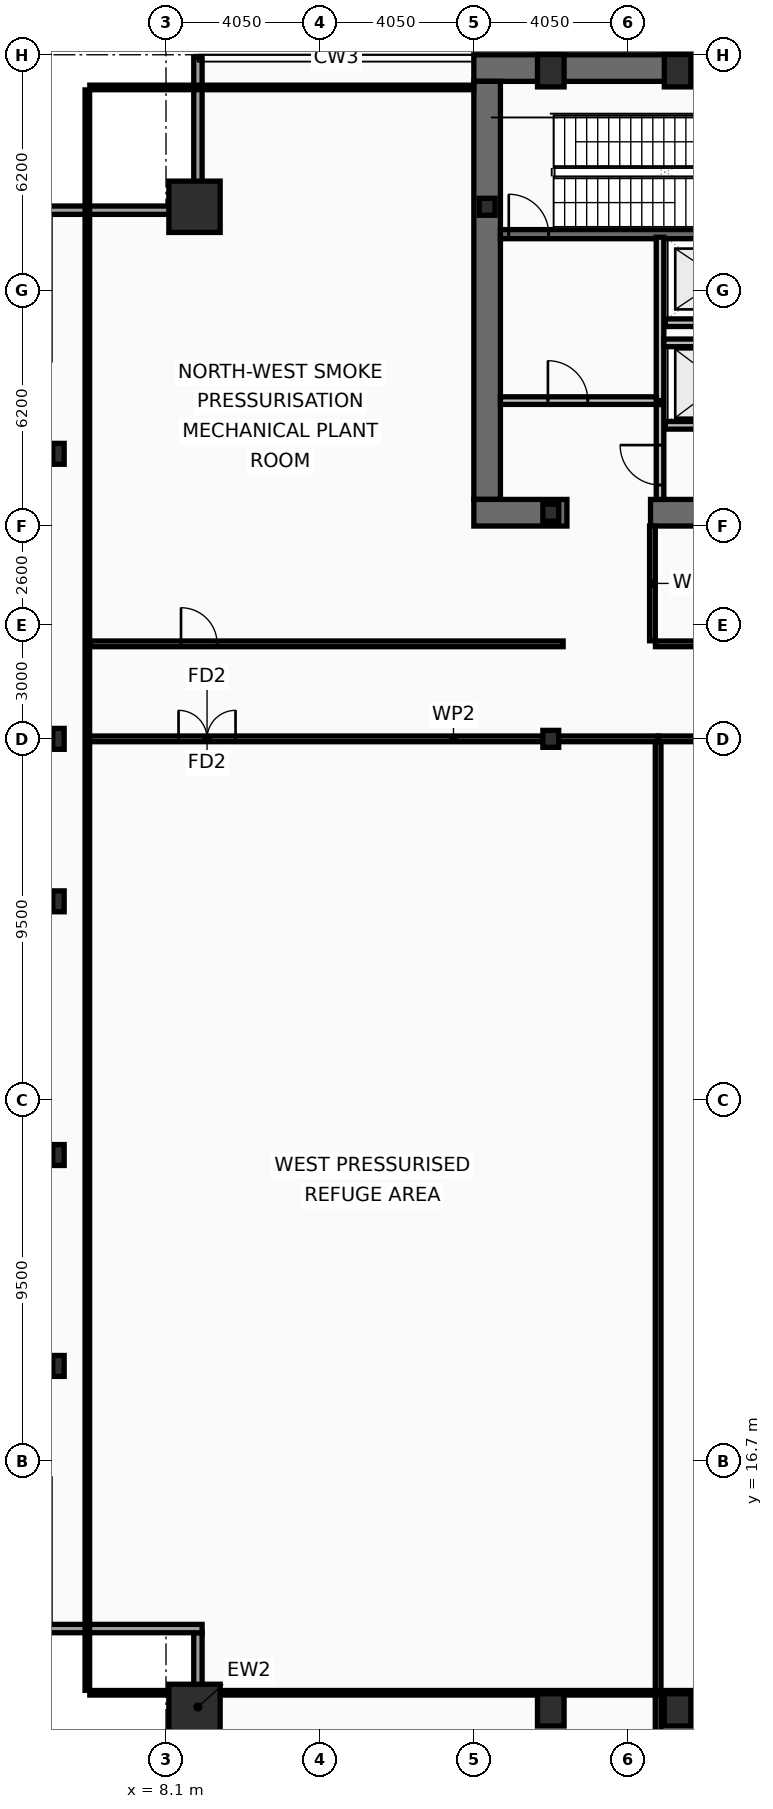
"""IFC4 building model, lengths in metres.
Left out: names, types, materials, properties, quantities, classifications, styles, units other than length and angle.
Written with IfcOpenShell. Run it as: python <this file> out.ifc"""

import sys

from ifc_helpers import new_model, si_unit, direction, frame, frame_2d, origin, origin_2d, place, context, subcontext, project, spatial, rectangle, hollow_rectangle, i_section, extrude, element, fill, save


model = new_model("IFC4")
c1 = context("Model", 3, precision=1e-05, world=origin(), true_north=direction((0.0, 1.0)))
c2 = subcontext(c1, "Body", "Model", "MODEL_VIEW")
j1 = project(units=[si_unit("LENGTHUNIT", "METRE"), si_unit("PLANEANGLEUNIT", "RADIAN")], contexts=[c1])
p1 = place(None, origin())
s1 = spatial("IfcSite", under=j1, at=p1, CompositionType="ELEMENT")
p2 = place(p1, origin())
s2 = spatial("IfcBuilding", under=s1, at=p2, CompositionType="ELEMENT")
p3 = place(p2, frame((0.0, 0.0, 172.2)))
s3 = spatial("IfcBuildingStorey", under=s2, at=p3, CompositionType="ELEMENT", Elevation=172.2)
p4 = place(p3, frame((16.2, 53.35, 0.0), z_axis=(0.0, 0.0, 1.0), x_axis=(1.0, 0.0, 0.0)))
e1 = element("IfcWall", 1, at=p4, inside=s3, PredefinedType="SHEAR", context=c2, shape_type="SweptSolid", body=[
    extrude(rectangle(XDim=40.5, YDim=0.7, at=frame_2d((20.25, 0.0))), origin(), (0.0, 0.0, 1.0), 4.64),
])
p5 = place(p3, frame((16.55, 42.0, 0.0), z_axis=(0.0, 0.0, 1.0), x_axis=(0.0, 1.0, 0.0)))
e2 = element("IfcWall", 2, at=p5, inside=s3, PredefinedType="SHEAR", context=c2, shape_type="SweptSolid", body=[
    extrude(rectangle(XDim=11.0, YDim=0.7, at=frame_2d((5.5, 0.0))), origin(), (0.0, 0.0, 1.0), 4.64),
])
p6 = place(p3, frame((18.65, 41.65, 0.0), z_axis=(0.0, 0.0, 1.0), x_axis=(-1.0, 0.0, 0.0)))
e3 = element("IfcWall", 3, at=p6, inside=s3, PredefinedType="SHEAR", context=c2, shape_type="SweptSolid", body=[
    extrude(rectangle(XDim=2.45, YDim=0.7, at=frame_2d((1.225, 0.0))), origin(), (0.0, 0.0, 1.0), 4.64),
])
p7 = place(p3, frame((32.3, 41.65, 0.0), z_axis=(0.0, 0.0, 1.0), x_axis=(-1.0, 0.0, 0.0)))
e4 = element("IfcWall", 4, at=p7, inside=s3, PredefinedType="SHEAR", context=c2, shape_type="SweptSolid", body=[
    extrude(rectangle(XDim=11.45, YDim=0.7, at=frame_2d((5.725, 0.0))), origin(), (0.0, 0.0, 1.0), 4.64),
])
p8 = place(p3, frame((16.9, 48.98, 0.0), z_axis=(0.0, 0.0, 1.0), x_axis=(1.0, 0.0, 0.0)))
e5 = element("IfcWall", 5, at=p8, inside=s3, PredefinedType="SHEAR", context=c2, shape_type="SweptSolid", body=[
    extrude(rectangle(XDim=7.32, YDim=0.24, at=frame_2d((3.66, 0.0))), origin(), (0.0, 0.0, 1.0), 4.64),
])
p9 = place(p8, frame((0.22, 0.0, 0.0)))
e6 = element("IfcOpeningElement", 6, at=p9, cuts=e5, PredefinedType="OPENING", context=c2, shape_type="SweptSolid", body=[
    extrude(rectangle(XDim=1.05, YDim=2.15, at=frame_2d((0.525, 1.075))), frame((0.0, 0.13, 0.0), z_axis=(0.0, -1.0, 0.0), x_axis=(1.0, 0.0, 0.0)), (0.0, 0.0, 1.0), 0.26),
])
for number, where, z_axis, x_axis in (
    (7, (8.85, 10.15, 0.0), (0.0, 0.0, 1.0), (1.0, 0.0, 0.0)),
    (8, (8.85, 49.7, 0.0), (0.0, 0.0, 1.0), (1.0, 0.0, 0.0)),
):
    element("IfcColumn", number, at=place(p3, frame(where, z_axis=z_axis, x_axis=x_axis)), inside=s3, PredefinedType="COLUMN", context=c2, shape_type="SweptSolid", body=[
        extrude(hollow_rectangle(XDim=1.35, YDim=1.35, WallThickness=0.065, at=origin_2d()), origin(), (0.0, 0.0, 1.0), 4.8),
    ])
for number, where, z_axis, x_axis in (
    (9, (18.225, 10.15, 0.0), (0.0, 0.0, 1.0), (1.0, 0.0, 0.0)),
    (10, (21.562, 10.15, 0.0), (0.0, 0.0, 1.0), (1.0, 0.0, 0.0)),
    (11, (18.225, 53.28, 0.0), (0.0, 0.0, 1.0), (1.0, 0.0, 0.0)),
    (12, (21.562, 53.28, 0.0), (0.0, 0.0, 1.0), (1.0, 0.0, 0.0)),
):
    element("IfcColumn", number, at=place(p3, frame(where, z_axis=z_axis, x_axis=x_axis)), inside=s3, PredefinedType="COLUMN", context=c2, shape_type="SweptSolid", body=[
        extrude(hollow_rectangle(XDim=0.7, YDim=0.85, WallThickness=0.05, at=origin_2d()), origin(), (0.0, 0.0, 1.0), 4.8),
    ])
for number, where, z_axis, x_axis in (
    (13, (5.27, 19.2, 0.0), (0.0, 0.0, 1.0), (1.0, 0.0, 0.0)),
    (14, (5.27, 24.75, 0.0), (0.0, 0.0, 1.0), (1.0, 0.0, 0.0)),
    (15, (5.27, 31.425, 0.0), (0.0, 0.0, 1.0), (1.0, 0.0, 0.0)),
    (16, (5.27, 35.7, 0.0), (0.0, 0.0, 1.0), (1.0, 0.0, 0.0)),
    (17, (5.27, 43.2, 0.0), (0.0, 0.0, 1.0), (1.0, 0.0, 0.0)),
):
    element("IfcColumn", number, at=place(p3, frame(where, z_axis=z_axis, x_axis=x_axis)), inside=s3, PredefinedType="COLUMN", context=c2, shape_type="SweptSolid", body=[
        extrude(i_section(OverallWidth=0.3, OverallDepth=0.55, WebThickness=0.015, FlangeThickness=0.029, at=origin_2d()), origin(), (0.0, 0.0, 1.0), 4.8),
    ])
for number, where, z_axis, x_axis in (
    (18, (16.55, 49.7, 0.0), (0.0, 0.0, 1.0), (1.0, 0.0, 0.0)),
    (19, (18.225, 35.7, 0.0), (0.0, 0.0, 1.0), (1.0, 0.0, 0.0)),
    (20, (18.225, 41.65, 0.0), (0.0, 0.0, 1.0), (1.0, 0.0, 0.0)),
):
    element("IfcColumn", number, at=place(p3, frame(where, z_axis=z_axis, x_axis=x_axis)), inside=s3, PredefinedType="COLUMN", context=c2, shape_type="SweptSolid", body=[
        extrude(i_section(OverallWidth=0.416, OverallDepth=0.446, WebThickness=0.039, FlangeThickness=0.063, at=origin_2d()), origin(), (0.0, 0.0, 1.0), 4.8),
    ])
p10 = place(p3, frame((8.94, 8.27, 0.0), z_axis=(0.0, 0.0, 1.0), x_axis=(0.0, 1.0, 0.0)))
e21 = element("IfcWall", 21, at=p10, inside=s3, PredefinedType="SOLIDWALL", context=c2, shape_type="SweptSolid", body=[
    extrude(rectangle(XDim=3.91, YDim=0.22, at=frame_2d((1.955, 0.0))), origin(), (0.0, 0.0, 1.0), 4.03),
])
for number, where, z_axis, x_axis in (
    (22, (9.05, 12.29, 0.0), (0.0, 0.0, 1.0), (-1.0, 0.0, 0.0)),
    (23, (4.83, 49.61, 0.0), (0.0, 0.0, 1.0), (1.0, 0.0, 0.0)),
):
    element("IfcWall", number, at=place(p3, frame(where, z_axis=z_axis, x_axis=x_axis)), inside=s3, PredefinedType="SOLIDWALL", context=c2, shape_type="SweptSolid", body=[
        extrude(rectangle(XDim=4.22, YDim=0.22, at=frame_2d((2.11, 0.0))), origin(), (0.0, 0.0, 1.0), 4.03),
    ])
p11 = place(p3, frame((8.94, 49.72, 0.0), z_axis=(0.0, 0.0, 1.0), x_axis=(0.0, 1.0, 0.0)))
e24 = element("IfcWall", 24, at=p11, inside=s3, PredefinedType="SOLIDWALL", context=c2, shape_type="SweptSolid", body=[
    extrude(rectangle(XDim=3.91, YDim=0.22, at=frame_2d((1.955, 0.0))), origin(), (0.0, 0.0, 1.0), 4.03),
])
p12 = place(p3, frame((24.21, 43.95, 0.0), z_axis=(0.0, 0.0, 1.0), x_axis=(-1.0, 0.0, 0.0)))
e25 = element("IfcWall", 25, at=p12, inside=s3, PredefinedType="PARTITIONING", context=c2, shape_type="SweptSolid", body=[
    extrude(rectangle(XDim=2.97, YDim=0.2, at=frame_2d((1.485, 0.0))), origin(), (0.0, 0.0, 1.0), 4.64),
])
p13 = place(p12, frame((0.86, 0.0, 0.0)))
e26 = element("IfcOpeningElement", 26, at=p13, cuts=e25, PredefinedType="OPENING", context=c2, shape_type="SweptSolid", body=[
    extrude(rectangle(XDim=1.3, YDim=2.18, at=frame_2d((0.65, 1.09))), frame((0.0, 0.11, 0.0), z_axis=(0.0, -1.0, 0.0), x_axis=(1.0, 0.0, 0.0)), (0.0, 0.0, 1.0), 0.22),
])
p14 = place(p3, frame((24.21, 46.65, 0.0), z_axis=(0.0, 0.0, 1.0), x_axis=(-1.0, 0.0, 0.0)))
e27 = element("IfcWall", 27, at=p14, inside=s3, PredefinedType="PARTITIONING", context=c2, shape_type="SweptSolid", body=[
    extrude(rectangle(XDim=2.97, YDim=0.2, at=frame_2d((1.485, 0.0))), origin(), (0.0, 0.0, 1.0), 4.64),
])
p15 = place(p14, frame((0.91, 0.0, 0.0)))
e28 = element("IfcOpeningElement", 28, at=p15, cuts=e27, PredefinedType="OPENING", context=c2, shape_type="SweptSolid", body=[
    extrude(rectangle(XDim=1.2, YDim=2.18, at=frame_2d((0.6, 1.09))), frame((0.0, 0.11, 0.0), z_axis=(0.0, -1.0, 0.0), x_axis=(1.0, 0.0, 0.0)), (0.0, 0.0, 1.0), 0.22),
])
p16 = place(p3, frame((21.1, 44.6, 0.0), z_axis=(0.0, 0.0, 1.0), x_axis=(0.0, 1.0, 0.0)))
e29 = element("IfcWall", 29, at=p16, inside=s3, PredefinedType="PARTITIONING", context=c2, shape_type="SweptSolid", body=[
    extrude(rectangle(XDim=4.3, YDim=0.2, at=frame_2d((2.15, 0.0))), origin(), (0.0, 0.0, 1.0), 4.64),
])
p17 = place(p3, frame((16.9, 44.6, 0.0), z_axis=(0.0, 0.0, 1.0), x_axis=(1.0, 0.0, 0.0)))
e30 = element("IfcWall", 30, at=p17, inside=s3, PredefinedType="PARTITIONING", context=c2, shape_type="SweptSolid", body=[
    extrude(rectangle(XDim=4.1, YDim=0.2, at=frame_2d((2.05, 0.0))), origin(), (0.0, 0.0, 1.0), 4.64),
])
p18 = place(p17, frame((1.25, 0.0, 0.0)))
e31 = element("IfcOpeningElement", 31, at=p18, cuts=e30, PredefinedType="OPENING", context=c2, shape_type="SweptSolid", body=[
    extrude(rectangle(XDim=1.05, YDim=2.15, at=frame_2d((0.525, 1.075))), frame((0.0, 0.11, 0.0), z_axis=(0.0, -1.0, 0.0), x_axis=(1.0, 0.0, 0.0)), (0.0, 0.0, 1.0), 0.22),
])
p19 = place(p3, frame((21.2, 46.12, 0.0), z_axis=(0.0, 0.0, 1.0), x_axis=(1.0, 0.0, 0.0)))
e32 = element("IfcWall", 32, at=p19, inside=s3, PredefinedType="PARTITIONING", context=c2, shape_type="SweptSolid", body=[
    extrude(rectangle(XDim=3.02, YDim=0.2, at=frame_2d((1.51, 0.0))), origin(), (0.0, 0.0, 1.0), 4.64),
])
p20 = place(p3, frame((21.1, 42.0, 0.0), z_axis=(0.0, 0.0, 1.0), x_axis=(0.0, 1.0, 0.0)))
e33 = element("IfcWall", 33, at=p20, inside=s3, PredefinedType="PARTITIONING", context=c2, shape_type="SweptSolid", body=[
    extrude(rectangle(XDim=2.495, YDim=0.2, at=frame_2d((1.248, 0.0))), origin(), (0.0, 0.0, 1.0), 4.64),
])
p21 = place(p20, frame((0.38, 0.0, 0.0)))
e34 = element("IfcOpeningElement", 34, at=p21, cuts=e33, PredefinedType="OPENING", context=c2, shape_type="SweptSolid", body=[
    extrude(rectangle(XDim=1.05, YDim=2.15, at=frame_2d((0.525, 1.075))), frame((0.0, 0.11, 0.0), z_axis=(0.0, -1.0, 0.0), x_axis=(1.0, 0.0, 0.0)), (0.0, 0.0, 1.0), 0.22),
])
p22 = place(p3, frame((6.03, 35.7, 0.0), z_axis=(0.0, 0.0, 1.0), x_axis=(1.0, 0.0, 0.0)))
e35 = element("IfcWall", 35, at=p22, inside=s3, PredefinedType="PARTITIONING", context=c2, shape_type="SweptSolid", body=[
    extrude(rectangle(XDim=15.02, YDim=0.15, at=frame_2d((7.51, 0.0))), origin(), (0.0, 0.0, 1.0), 3.93),
])
p23 = place(p22, frame((2.4, 0.0, 0.0)))
e36 = element("IfcOpeningElement", 36, at=p23, cuts=e35, PredefinedType="OPENING", context=c2, shape_type="SweptSolid", body=[
    extrude(rectangle(XDim=1.5, YDim=2.15, at=frame_2d((0.75, 1.075))), frame((0.0, 0.085, 0.0), z_axis=(0.0, -1.0, 0.0), x_axis=(1.0, 0.0, 0.0)), (0.0, 0.0, 1.0), 0.17),
])
p24 = place(p3, frame((21.05, 35.7, 0.0), z_axis=(0.0, 0.0, 1.0), x_axis=(1.0, 0.0, 0.0)))
e37 = element("IfcWall", 37, at=p24, inside=s3, PredefinedType="PARTITIONING", context=c2, shape_type="SweptSolid", body=[
    extrude(rectangle(XDim=4.4, YDim=0.15, at=frame_2d((2.2, 0.0))), origin(), (0.0, 0.0, 1.0), 3.93),
])
p25 = place(p3, frame((21.05, 8.32, 0.0), z_axis=(0.0, 0.0, 1.0), x_axis=(0.0, 1.0, 0.0)))
e38 = element("IfcWall", 38, at=p25, inside=s3, PredefinedType="PARTITIONING", context=c2, shape_type="SweptSolid", body=[
    extrude(rectangle(XDim=27.3, YDim=0.15, at=frame_2d((13.65, 0.0))), origin(), (0.0, 0.0, 1.0), 3.83),
])
p26 = place(p3, frame((20.98, 38.2, 0.0), z_axis=(0.0, 0.0, 1.0), x_axis=(1.0, 0.0, 0.0)))
e39 = element("IfcWall", 39, at=p26, inside=s3, PredefinedType="PARTITIONING", context=c2, shape_type="SweptSolid", body=[
    extrude(rectangle(XDim=3.54, YDim=0.15, at=frame_2d((1.77, 0.0))), origin(), (0.0, 0.0, 1.0), 3.93),
])
p27 = place(p26, frame((1.1, 0.0, 0.0)))
e40 = element("IfcOpeningElement", 40, at=p27, cuts=e39, PredefinedType="OPENING", context=c2, shape_type="SweptSolid", body=[
    extrude(rectangle(XDim=0.95, YDim=2.05, at=frame_2d((0.475, 1.025))), frame((0.0, 0.085, 0.0), z_axis=(0.0, -1.0, 0.0), x_axis=(1.0, 0.0, 0.0)), (0.0, 0.0, 1.0), 0.17),
])
p28 = place(p3, frame((20.9, 38.28, 0.0), z_axis=(0.0, 0.0, 1.0), x_axis=(0.0, 1.0, 0.0)))
e41 = element("IfcWall", 41, at=p28, inside=s3, PredefinedType="PARTITIONING", context=c2, shape_type="SweptSolid", body=[
    extrude(rectangle(XDim=3.02, YDim=0.15, at=frame_2d((1.51, 0.0))), origin(), (0.0, 0.0, 1.0), 4.64),
])
p29 = place(p3, frame((6.095, 38.2, 0.0), z_axis=(0.0, 0.0, 1.0), x_axis=(1.0, 0.0, 0.0)))
e42 = element("IfcWall", 42, at=p29, inside=s3, PredefinedType="PARTITIONING", context=c2, shape_type="SweptSolid", body=[
    extrude(rectangle(XDim=12.455, YDim=0.15, at=frame_2d((6.228, 0.0))), origin(), (0.0, 0.0, 1.0), 3.93),
])
p30 = place(p29, frame((2.4, 0.0, 0.0)))
e43 = element("IfcOpeningElement", 43, at=p30, cuts=e42, PredefinedType="OPENING", context=c2, shape_type="SweptSolid", body=[
    extrude(rectangle(XDim=0.95, YDim=2.1, at=frame_2d((0.475, 1.05))), frame((0.0, 0.085, 0.0), z_axis=(0.0, -1.0, 0.0), x_axis=(1.0, 0.0, 0.0)), (0.0, 0.0, 1.0), 0.17),
])
p31 = place(p3, frame((6.03, 10.665, 0.0), z_axis=(0.0, 0.0, 1.0), x_axis=(0.0, 1.0, 0.0)))
e44 = element("IfcWall", 44, at=p31, inside=s3, PredefinedType="PARTITIONING", context=c2, shape_type="SweptSolid", body=[
    extrude(rectangle(XDim=42.11, YDim=0.12, at=frame_2d((21.055, 0.0))), origin(), (0.0, 0.0, 1.0), 3.93),
])
p32 = place(p3, frame((6.095, 52.84, 0.0), z_axis=(0.0, 0.0, 1.0), x_axis=(1.0, 0.0, 0.0)))
e45 = element("IfcWall", 45, at=p32, inside=s3, PredefinedType="PARTITIONING", context=c2, shape_type="SweptSolid", body=[
    extrude(rectangle(XDim=10.105, YDim=0.12, at=frame_2d((5.052, 0.0))), origin(), (0.0, 0.0, 1.0), 4.64),
])
p33 = place(p3, frame((6.095, 10.6, 0.0), z_axis=(0.0, 0.0, 1.0), x_axis=(1.0, 0.0, 0.0)))
e46 = element("IfcWall", 46, at=p33, inside=s3, PredefinedType="PARTITIONING", context=c2, shape_type="SweptSolid", body=[
    extrude(rectangle(XDim=60.71, YDim=0.12, at=frame_2d((30.355, 0.0))), origin(), (0.0, 0.0, 1.0), 3.93),
])
p34 = place(p9, origin())
e47 = element("IfcDoor", 47, at=p34, inside=s3, OperationType="SINGLE_SWING_LEFT", PredefinedType="DOOR", context=c2, shape_type="SweptSolid", body=[
    extrude(rectangle(XDim=1.05, YDim=2.15, at=frame_2d((0.525, 1.075))), frame((0.0, 0.025, 0.0), z_axis=(0.0, -1.0, 0.0), x_axis=(1.0, 0.0, 0.0)), (0.0, 0.0, 1.0), 0.05),
])
fill(e6, e47)
p35 = place(p18, origin())
e48 = element("IfcDoor", 48, at=p35, inside=s3, OperationType="SINGLE_SWING_LEFT", PredefinedType="DOOR", context=c2, shape_type="SweptSolid", body=[
    extrude(rectangle(XDim=1.05, YDim=2.15, at=frame_2d((0.525, 1.075))), frame((0.0, 0.025, 0.0), z_axis=(0.0, -1.0, 0.0), x_axis=(1.0, 0.0, 0.0)), (0.0, 0.0, 1.0), 0.05),
])
fill(e31, e48)
p36 = place(p21, origin())
e49 = element("IfcDoor", 49, at=p36, inside=s3, OperationType="SINGLE_SWING_RIGHT", PredefinedType="DOOR", context=c2, shape_type="SweptSolid", body=[
    extrude(rectangle(XDim=1.05, YDim=2.15, at=frame_2d((0.525, 1.075))), frame((0.0, 0.025, 0.0), z_axis=(0.0, -1.0, 0.0), x_axis=(1.0, 0.0, 0.0)), (0.0, 0.0, 1.0), 0.05),
])
fill(e34, e49)
p37 = place(p23, origin())
e50 = element("IfcDoor", 50, at=p37, inside=s3, OperationType="DOUBLE_DOOR_SINGLE_SWING", PredefinedType="DOOR", context=c2, shape_type="SweptSolid", body=[
    extrude(rectangle(XDim=1.5, YDim=2.15, at=frame_2d((0.75, 1.075))), frame((0.0, 0.025, 0.0), z_axis=(0.0, -1.0, 0.0), x_axis=(1.0, 0.0, 0.0)), (0.0, 0.0, 1.0), 0.05),
])
fill(e36, e50)
p38 = place(p30, origin())
e51 = element("IfcDoor", 51, at=p38, inside=s3, OperationType="SINGLE_SWING_LEFT", PredefinedType="DOOR", context=c2, shape_type="SweptSolid", body=[
    extrude(rectangle(XDim=0.95, YDim=2.1, at=frame_2d((0.475, 1.05))), frame((0.0, 0.025, 0.0), z_axis=(0.0, -1.0, 0.0), x_axis=(1.0, 0.0, 0.0)), (0.0, 0.0, 1.0), 0.05),
])
fill(e43, e51)
save(model, sys.argv[1])
